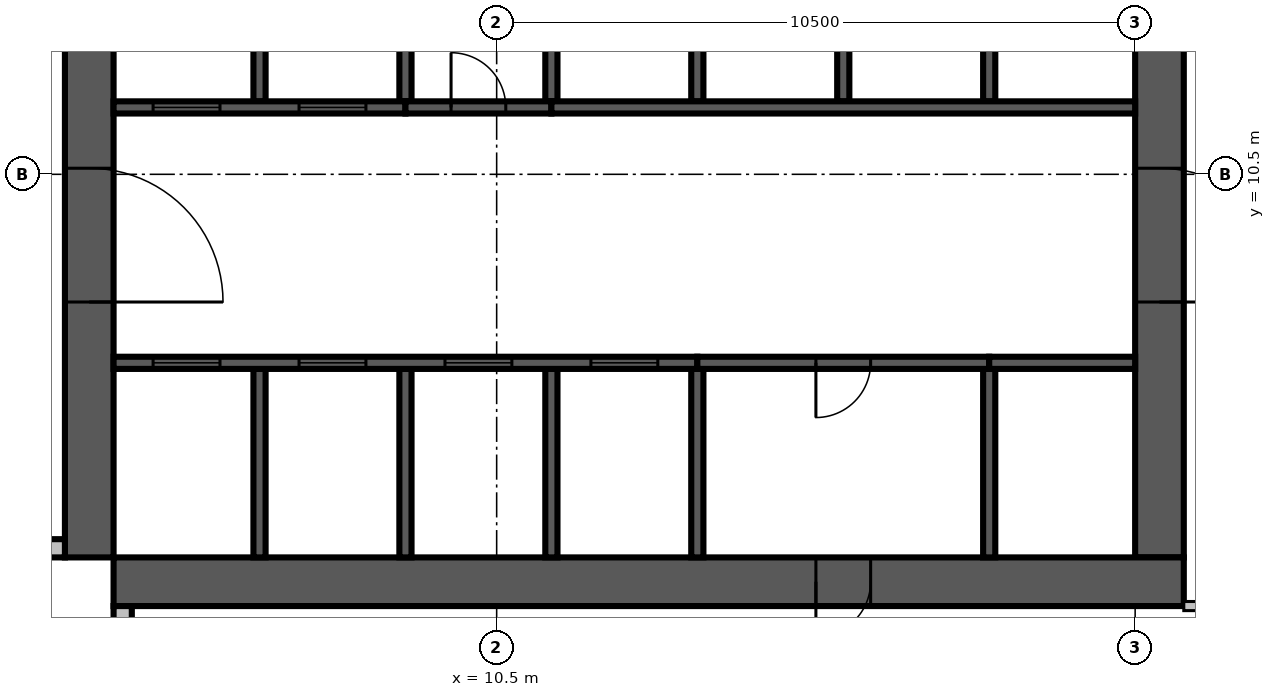
"""IFC4 building model, lengths in metres.
Left out: names, types, materials, properties, quantities, classifications, styles, units other than length and angle.
Written with IfcOpenShell. Run it as: python <this file> out.ifc"""

import sys

from ifc_helpers import new_model, si_unit, direction, frame, frame_2d, origin, place, context, subcontext, project, spatial, rectangle, extrude, source, transform, mapped, element, fill, save


model = new_model("IFC4")
c1 = context("Model", 3, precision=1e-05, world=origin(), true_north=direction((0.0, 1.0)))
c2 = subcontext(c1, "Body", "Model", "MODEL_VIEW")
j1 = project(units=[si_unit("LENGTHUNIT", "METRE"), si_unit("PLANEANGLEUNIT", "RADIAN")], contexts=[c1])
p1 = place(None, origin())
s1 = spatial("IfcSite", under=j1, at=p1, CompositionType="ELEMENT")
p2 = place(p1, origin())
s2 = spatial("IfcBuilding", under=s1, at=p2, CompositionType="ELEMENT")
p3 = place(p2, frame((0.0, 0.0, 185.4)))
s3 = spatial("IfcBuildingStorey", under=s2, at=p3, CompositionType="ELEMENT", Elevation=185.4)
m1 = source(origin(), c2, "Body", "SweptSolid", [
    extrude(rectangle(XDim=17.6, YDim=0.8, at=frame_2d((8.8, 0.0))), origin(), (0.0, 0.0, 1.0), 3.8),
])
p4 = place(p3, frame((3.8, 4.2, 0.0), z_axis=(0.0, 0.0, 1.0), x_axis=(0.0, 1.0, 0.0)))
e1 = element("IfcWall", 1, at=p4, inside=s3, PredefinedType="SHEAR", context=c2, shape_type="MappedRepresentation", body=[
    mapped(m1, transform((0.0, 0.0, 0.0), scale=1.0)),
])
m2 = source(origin(), c2, "Body", "SweptSolid", [
    extrude(rectangle(XDim=2.2, YDim=2.1, at=frame_2d((1.1, 1.05))), frame((0.0, 0.41, 0.0), z_axis=(0.0, -1.0, 0.0), x_axis=(1.0, 0.0, 0.0)), (0.0, 0.0, 1.0), 0.82),
])
p5 = place(p4, frame((4.2, 0.0, 0.0)))
e2 = element("IfcOpeningElement", 2, at=p5, cuts=e1, PredefinedType="OPENING", context=c2, shape_type="MappedRepresentation", body=[
    mapped(m2, transform((0.0, 0.0, 0.0), scale=1.0)),
])
m3 = source(origin(), c2, "Body", "SweptSolid", [
    extrude(rectangle(XDim=0.9, YDim=2.1, at=frame_2d((0.45, 1.05))), frame((0.0, 0.41, 0.0), z_axis=(0.0, -1.0, 0.0), x_axis=(1.0, 0.0, 0.0)), (0.0, 0.0, 1.0), 0.82),
])
p6 = place(p4, frame((10.95, 0.0, 0.0)))
e3 = element("IfcOpeningElement", 3, at=p6, cuts=e1, PredefinedType="OPENING", context=c2, shape_type="MappedRepresentation", body=[
    mapped(m3, transform((0.0, 0.0, 0.0), scale=1.0)),
])
m4 = source(origin(), c2, "Body", "SweptSolid", [
    extrude(rectangle(XDim=16.8, YDim=0.8, at=frame_2d((8.4, 0.0))), origin(), (0.0, 0.0, 1.0), 3.8),
])
p7 = place(p3, frame((21.4, 4.2, 0.0), z_axis=(0.0, 0.0, 1.0), x_axis=(0.0, 1.0, 0.0)))
e4 = element("IfcWall", 4, at=p7, inside=s3, PredefinedType="SHEAR", context=c2, shape_type="MappedRepresentation", body=[
    mapped(m4, transform((0.0, 0.0, 0.0), scale=1.0)),
])
p8 = place(p7, frame((4.2, 0.0, 0.0)))
e5 = element("IfcOpeningElement", 5, at=p8, cuts=e4, PredefinedType="OPENING", context=c2, shape_type="MappedRepresentation", body=[
    mapped(m2, transform((0.0, 0.0, 0.0), scale=1.0)),
])
m5 = source(origin(), c2, "Body", "SweptSolid", [
    extrude(rectangle(XDim=1.2, YDim=2.1, at=frame_2d((0.6, 1.05))), frame((0.0, 0.41, 0.0), z_axis=(0.0, -1.0, 0.0), x_axis=(1.0, 0.0, 0.0)), (0.0, 0.0, 1.0), 0.82),
])
p9 = place(p7, frame((14.7, 0.0, 0.0)))
e6 = element("IfcOpeningElement", 6, at=p9, cuts=e4, PredefinedType="OPENING", context=c2, shape_type="MappedRepresentation", body=[
    mapped(m5, transform((0.0, 0.0, 0.0), scale=1.0)),
])
p10 = place(p3, frame((4.2, 3.8, 0.0), z_axis=(0.0, 0.0, 1.0), x_axis=(1.0, 0.0, 0.0)))
e7 = element("IfcWall", 7, at=p10, inside=s3, PredefinedType="SHEAR", context=c2, shape_type="MappedRepresentation", body=[
    mapped(m1, transform((0.0, 0.0, 0.0), scale=1.0)),
])
p11 = place(p10, frame((11.55, 0.0, 0.0)))
e8 = element("IfcOpeningElement", 8, at=p11, cuts=e7, PredefinedType="OPENING", context=c2, shape_type="MappedRepresentation", body=[
    mapped(m3, transform((0.0, 0.0, 0.0), scale=1.0)),
])
m6 = source(origin(), c2, "Body", "SweptSolid", [
    extrude(rectangle(XDim=3.4, YDim=0.3, at=frame_2d((1.7, 0.0))), origin(), (0.0, 0.0, 1.0), 3.4),
])
p12 = place(p3, frame((0.0, 4.35, 0.0), z_axis=(0.0, 0.0, 1.0), x_axis=(1.0, 0.0, 0.0)))
e9 = element("IfcWall", 9, at=p12, inside=s3, PredefinedType="STANDARD", context=c2, shape_type="MappedRepresentation", body=[
    mapped(m6, transform((0.0, 0.0, 0.0), scale=1.0)),
])
m7 = source(origin(), c2, "Body", "SweptSolid", [
    extrude(rectangle(XDim=1.8, YDim=2.3, at=frame_2d((0.9, 1.15))), frame((0.0, 0.16, 0.0), z_axis=(0.0, -1.0, 0.0), x_axis=(1.0, 0.0, 0.0)), (0.0, 0.0, 1.0), 0.32),
])
p13 = place(p12, frame((1.2, 0.0, 0.6)))
e10 = element("IfcOpeningElement", 10, at=p13, cuts=e9, PredefinedType="OPENING", context=c2, shape_type="MappedRepresentation", body=[
    mapped(m7, transform((0.0, 0.0, 0.0), scale=1.0)),
])
p14 = place(p3, frame((4.35, 3.4, 0.0), z_axis=(0.0, 0.0, 1.0), x_axis=(0.0, -1.0, 0.0)))
e11 = element("IfcWall", 11, at=p14, inside=s3, PredefinedType="STANDARD", context=c2, shape_type="MappedRepresentation", body=[
    mapped(m6, transform((0.0, 0.0, 0.0), scale=1.0)),
])
p15 = place(p14, frame((0.4, 0.0, 0.6)))
e12 = element("IfcOpeningElement", 12, at=p15, cuts=e11, PredefinedType="OPENING", context=c2, shape_type="MappedRepresentation", body=[
    mapped(m7, transform((0.0, 0.0, 0.0), scale=1.0)),
])
m8 = source(origin(), c2, "Body", "SweptSolid", [
    extrude(rectangle(XDim=3.1, YDim=0.2, at=frame_2d((1.55, 0.0))), origin(), (0.0, 0.0, 1.0), 3.8),
])
for number, where, z_axis, x_axis in (
    (13, (6.6, 4.2, 0.0), (0.0, 0.0, 1.0), (0.0, 1.0, 0.0)),
    (14, (9.0, 4.2, 0.0), (0.0, 0.0, 1.0), (0.0, 1.0, 0.0)),
    (15, (11.4, 4.2, 0.0), (0.0, 0.0, 1.0), (0.0, 1.0, 0.0)),
):
    element("IfcWall", number, at=place(p3, frame(where, z_axis=z_axis, x_axis=x_axis)), inside=s3, PredefinedType="SOLIDWALL", context=c2, shape_type="MappedRepresentation", body=[
        mapped(m8, transform((0.0, 0.0, 0.0), scale=1.0)),
    ])
m9 = source(origin(), c2, "Body", "SweptSolid", [
    extrude(rectangle(XDim=3.1, YDim=0.2, at=frame_2d((1.55, 0.0))), origin(), (0.0, 0.0, 1.0), 3.4),
])
for number, where, z_axis, x_axis in (
    (16, (13.8, 4.2, 0.0), (0.0, 0.0, 1.0), (0.0, 1.0, 0.0)),
    (17, (18.6, 4.2, 0.0), (0.0, 0.0, 1.0), (0.0, 1.0, 0.0)),
):
    element("IfcWall", number, at=place(p3, frame(where, z_axis=z_axis, x_axis=x_axis)), inside=s3, PredefinedType="SOLIDWALL", context=c2, shape_type="MappedRepresentation", body=[
        mapped(m9, transform((0.0, 0.0, 0.0), scale=1.0)),
    ])
m10 = source(origin(), c2, "Body", "SweptSolid", [
    extrude(rectangle(XDim=3.0, YDim=0.2, at=frame_2d((1.5, 0.0))), origin(), (0.0, 0.0, 1.0), 3.8),
])
p16 = place(p3, frame((6.6, 11.7, 0.0), z_axis=(0.0, 0.0, 1.0), x_axis=(0.0, 1.0, 0.0)))
e18 = element("IfcWall", 18, at=p16, inside=s3, PredefinedType="SOLIDWALL", context=c2, shape_type="MappedRepresentation", body=[
    mapped(m10, transform((0.0, 0.0, 0.0), scale=1.0)),
])
m11 = source(origin(), c2, "Body", "SweptSolid", [
    extrude(rectangle(XDim=3.0, YDim=0.2, at=frame_2d((1.5, 0.0))), origin(), (0.0, 0.0, 1.0), 3.4),
])
for number, where, z_axis, x_axis in (
    (19, (9.0, 11.7, 0.0), (0.0, 0.0, 1.0), (0.0, 1.0, 0.0)),
    (20, (11.4, 11.7, 0.0), (0.0, 0.0, 1.0), (0.0, 1.0, 0.0)),
):
    element("IfcWall", number, at=place(p3, frame(where, z_axis=z_axis, x_axis=x_axis)), inside=s3, PredefinedType="SOLIDWALL", context=c2, shape_type="MappedRepresentation", body=[
        mapped(m11, transform((0.0, 0.0, 0.0), scale=1.0)),
    ])
for number, where, z_axis, x_axis in (
    (21, (13.8, 11.7, 0.0), (0.0, 0.0, 1.0), (0.0, 1.0, 0.0)),
    (22, (16.2, 11.7, 0.0), (0.0, 0.0, 1.0), (0.0, 1.0, 0.0)),
    (23, (18.6, 11.7, 0.0), (0.0, 0.0, 1.0), (0.0, 1.0, 0.0)),
):
    element("IfcWall", number, at=place(p3, frame(where, z_axis=z_axis, x_axis=x_axis)), inside=s3, PredefinedType="SOLIDWALL", context=c2, shape_type="MappedRepresentation", body=[
        mapped(m10, transform((0.0, 0.0, 0.0), scale=1.0)),
    ])
m12 = source(origin(), c2, "Body", "SweptSolid", [
    extrude(rectangle(XDim=9.6, YDim=0.2, at=frame_2d((4.8, 0.0))), origin(), (0.0, 0.0, 1.0), 3.8),
])
p17 = place(p3, frame((4.2, 7.4, 0.0), z_axis=(0.0, 0.0, 1.0), x_axis=(1.0, 0.0, 0.0)))
e24 = element("IfcWall", 24, at=p17, inside=s3, PredefinedType="SOLIDWALL", context=c2, shape_type="MappedRepresentation", body=[
    mapped(m12, transform((0.0, 0.0, 0.0), scale=1.0)),
])
m13 = source(origin(), c2, "Body", "SweptSolid", [
    extrude(rectangle(XDim=1.1, YDim=2.1, at=frame_2d((0.55, 1.05))), frame((0.0, 0.11, 0.0), z_axis=(0.0, -1.0, 0.0), x_axis=(1.0, 0.0, 0.0)), (0.0, 0.0, 1.0), 0.22),
])
p18 = place(p17, frame((0.65, 0.0, 0.0)))
e25 = element("IfcOpeningElement", 25, at=p18, cuts=e24, PredefinedType="OPENING", context=c2, shape_type="MappedRepresentation", body=[
    mapped(m13, transform((0.0, 0.0, 0.0), scale=1.0)),
])
p19 = place(p17, frame((3.05, 0.0, 0.0)))
e26 = element("IfcOpeningElement", 26, at=p19, cuts=e24, PredefinedType="OPENING", context=c2, shape_type="MappedRepresentation", body=[
    mapped(m13, transform((0.0, 0.0, 0.0), scale=1.0)),
])
p20 = place(p17, frame((5.45, 0.0, 0.0)))
e27 = element("IfcOpeningElement", 27, at=p20, cuts=e24, PredefinedType="OPENING", context=c2, shape_type="MappedRepresentation", body=[
    mapped(m13, transform((0.0, 0.0, 0.0), scale=1.0)),
])
p21 = place(p17, frame((7.85, 0.0, 0.0)))
e28 = element("IfcOpeningElement", 28, at=p21, cuts=e24, PredefinedType="OPENING", context=c2, shape_type="MappedRepresentation", body=[
    mapped(m13, transform((0.0, 0.0, 0.0), scale=1.0)),
])
m14 = source(origin(), c2, "Body", "SweptSolid", [
    extrude(rectangle(XDim=4.8, YDim=0.2, at=frame_2d((2.4, 0.0))), origin(), (0.0, 0.0, 1.0), 3.4),
])
p22 = place(p3, frame((13.8, 7.4, 0.0), z_axis=(0.0, 0.0, 1.0), x_axis=(1.0, 0.0, 0.0)))
e29 = element("IfcWall", 29, at=p22, inside=s3, PredefinedType="SOLIDWALL", context=c2, shape_type="MappedRepresentation", body=[
    mapped(m14, transform((0.0, 0.0, 0.0), scale=1.0)),
])
m15 = source(origin(), c2, "Body", "SweptSolid", [
    extrude(rectangle(XDim=0.9, YDim=2.1, at=frame_2d((0.45, 1.05))), frame((0.0, 0.11, 0.0), z_axis=(0.0, -1.0, 0.0), x_axis=(1.0, 0.0, 0.0)), (0.0, 0.0, 1.0), 0.22),
])
p23 = place(p22, frame((1.95, 0.0, 0.0)))
e30 = element("IfcOpeningElement", 30, at=p23, cuts=e29, PredefinedType="OPENING", context=c2, shape_type="MappedRepresentation", body=[
    mapped(m15, transform((0.0, 0.0, 0.0), scale=1.0)),
])
m16 = source(origin(), c2, "Body", "SweptSolid", [
    extrude(rectangle(XDim=2.4, YDim=0.2, at=frame_2d((1.2, 0.0))), origin(), (0.0, 0.0, 1.0), 3.8),
])
p24 = place(p3, frame((18.6, 7.4, 0.0), z_axis=(0.0, 0.0, 1.0), x_axis=(1.0, 0.0, 0.0)))
e31 = element("IfcWall", 31, at=p24, inside=s3, PredefinedType="SOLIDWALL", context=c2, shape_type="MappedRepresentation", body=[
    mapped(m16, transform((0.0, 0.0, 0.0), scale=1.0)),
])
m17 = source(origin(), c2, "Body", "SweptSolid", [
    extrude(rectangle(XDim=4.8, YDim=0.2, at=frame_2d((2.4, 0.0))), origin(), (0.0, 0.0, 1.0), 3.8),
])
p25 = place(p3, frame((4.2, 11.6, 0.0), z_axis=(0.0, 0.0, 1.0), x_axis=(1.0, 0.0, 0.0)))
e32 = element("IfcWall", 32, at=p25, inside=s3, PredefinedType="SOLIDWALL", context=c2, shape_type="MappedRepresentation", body=[
    mapped(m17, transform((0.0, 0.0, 0.0), scale=1.0)),
])
p26 = place(p25, frame((0.65, 0.0, 0.0)))
e33 = element("IfcOpeningElement", 33, at=p26, cuts=e32, PredefinedType="OPENING", context=c2, shape_type="MappedRepresentation", body=[
    mapped(m13, transform((0.0, 0.0, 0.0), scale=1.0)),
])
p27 = place(p25, frame((3.05, 0.0, 0.0)))
e34 = element("IfcOpeningElement", 34, at=p27, cuts=e32, PredefinedType="OPENING", context=c2, shape_type="MappedRepresentation", body=[
    mapped(m13, transform((0.0, 0.0, 0.0), scale=1.0)),
])
m18 = source(origin(), c2, "Body", "SweptSolid", [
    extrude(rectangle(XDim=2.4, YDim=0.2, at=frame_2d((1.2, 0.0))), origin(), (0.0, 0.0, 1.0), 3.4),
])
p28 = place(p3, frame((9.0, 11.6, 0.0), z_axis=(0.0, 0.0, 1.0), x_axis=(1.0, 0.0, 0.0)))
e35 = element("IfcWall", 35, at=p28, inside=s3, PredefinedType="SOLIDWALL", context=c2, shape_type="MappedRepresentation", body=[
    mapped(m18, transform((0.0, 0.0, 0.0), scale=1.0)),
])
p29 = place(p28, frame((0.75, 0.0, 0.0)))
e36 = element("IfcOpeningElement", 36, at=p29, cuts=e35, PredefinedType="OPENING", context=c2, shape_type="MappedRepresentation", body=[
    mapped(m15, transform((0.0, 0.0, 0.0), scale=1.0)),
])
p30 = place(p3, frame((11.4, 11.6, 0.0), z_axis=(0.0, 0.0, 1.0), x_axis=(1.0, 0.0, 0.0)))
e37 = element("IfcWall", 37, at=p30, inside=s3, PredefinedType="SOLIDWALL", context=c2, shape_type="MappedRepresentation", body=[
    mapped(m12, transform((0.0, 0.0, 0.0), scale=1.0)),
])
m19 = source(origin(), c2, "Body", "SweptSolid", [
    extrude(rectangle(XDim=7.525, YDim=0.15, at=frame_2d((3.763, 0.0))), origin(), (0.0, 0.0, 1.0), 3.4),
])
p31 = place(p3, frame((21.8, 3.4, 0.0), z_axis=(0.0, 0.0, 1.0), x_axis=(1.0, 0.0, 0.0)))
e38 = element("IfcWall", 38, at=p31, inside=s3, PredefinedType="PARTITIONING", context=c2, shape_type="MappedRepresentation", body=[
    mapped(m19, transform((0.0, 0.0, 0.0), scale=1.0)),
])
m20 = source(origin(), c2, "Body", "SweptSolid", [
    extrude(rectangle(XDim=1.0, YDim=2.1, at=frame_2d((0.5, 1.05))), frame((0.0, 0.085, 0.0), z_axis=(0.0, -1.0, 0.0), x_axis=(1.0, 0.0, 0.0)), (0.0, 0.0, 1.0), 0.17),
])
p32 = place(p31, frame((3.3, 0.0, 0.0)))
e39 = element("IfcOpeningElement", 39, at=p32, cuts=e38, PredefinedType="OPENING", context=c2, shape_type="MappedRepresentation", body=[
    mapped(m20, transform((0.0, 0.0, 0.0), scale=1.0)),
])
m21 = source(origin(), c2, "Body", "SweptSolid", [
    extrude(rectangle(XDim=0.9, YDim=2.1, at=frame_2d((0.45, 1.05))), frame((0.0, 0.085, 0.0), z_axis=(0.0, -1.0, 0.0), x_axis=(1.0, 0.0, 0.0)), (0.0, 0.0, 1.0), 0.17),
])
p33 = place(p31, frame((2.312, 0.0, 0.0)))
e40 = element("IfcOpeningElement", 40, at=p33, cuts=e38, PredefinedType="OPENING", context=c2, shape_type="MappedRepresentation", body=[
    mapped(m21, transform((0.0, 0.0, 0.0), scale=1.0)),
])
m22 = source(origin(), c2, "Body", "SweptSolid", [
    extrude(rectangle(XDim=1.1, YDim=2.1, at=frame_2d((0.55, 1.05))), frame((0.0, 0.025, 0.0), z_axis=(0.0, -1.0, 0.0), x_axis=(1.0, 0.0, 0.0)), (0.0, 0.0, 1.0), 0.05),
])
p34 = place(p18, origin())
e41 = element("IfcDoor", 41, at=p34, inside=s3, OperationType="SLIDING_TO_LEFT", PredefinedType="DOOR", context=c2, shape_type="MappedRepresentation", body=[
    mapped(m22, transform((0.0, 0.0, 0.0), scale=1.0)),
])
fill(e25, e41)
p35 = place(p19, origin())
e42 = element("IfcDoor", 42, at=p35, inside=s3, OperationType="SLIDING_TO_LEFT", PredefinedType="DOOR", context=c2, shape_type="MappedRepresentation", body=[
    mapped(m22, transform((0.0, 0.0, 0.0), scale=1.0)),
])
fill(e26, e42)
p36 = place(p20, origin())
e43 = element("IfcDoor", 43, at=p36, inside=s3, OperationType="SLIDING_TO_LEFT", PredefinedType="DOOR", context=c2, shape_type="MappedRepresentation", body=[
    mapped(m22, transform((0.0, 0.0, 0.0), scale=1.0)),
])
fill(e27, e43)
p37 = place(p21, origin())
e44 = element("IfcDoor", 44, at=p37, inside=s3, OperationType="SLIDING_TO_LEFT", PredefinedType="DOOR", context=c2, shape_type="MappedRepresentation", body=[
    mapped(m22, transform((0.0, 0.0, 0.0), scale=1.0)),
])
fill(e28, e44)
m23 = source(origin(), c2, "Body", "SweptSolid", [
    extrude(rectangle(XDim=0.9, YDim=2.1, at=frame_2d((0.45, 1.05))), frame((0.0, 0.025, 0.0), z_axis=(0.0, -1.0, 0.0), x_axis=(1.0, 0.0, 0.0)), (0.0, 0.0, 1.0), 0.05),
])
p38 = place(p23, origin())
e45 = element("IfcDoor", 45, at=p38, inside=s3, OperationType="SINGLE_SWING_RIGHT", PredefinedType="DOOR", context=c2, shape_type="MappedRepresentation", body=[
    mapped(m23, transform((0.0, 0.0, 0.0), scale=1.0)),
])
fill(e30, e45)
p39 = place(p26, origin())
e46 = element("IfcDoor", 46, at=p39, inside=s3, OperationType="SLIDING_TO_LEFT", PredefinedType="DOOR", context=c2, shape_type="MappedRepresentation", body=[
    mapped(m22, transform((0.0, 0.0, 0.0), scale=1.0)),
])
fill(e33, e46)
p40 = place(p27, origin())
e47 = element("IfcDoor", 47, at=p40, inside=s3, OperationType="SLIDING_TO_LEFT", PredefinedType="DOOR", context=c2, shape_type="MappedRepresentation", body=[
    mapped(m22, transform((0.0, 0.0, 0.0), scale=1.0)),
])
fill(e34, e47)
p41 = place(p29, origin())
e48 = element("IfcDoor", 48, at=p41, inside=s3, OperationType="SINGLE_SWING_LEFT", PredefinedType="DOOR", context=c2, shape_type="MappedRepresentation", body=[
    mapped(m23, transform((0.0, 0.0, 0.0), scale=1.0)),
])
fill(e36, e48)
m24 = source(origin(), c2, "Body", "SweptSolid", [
    extrude(rectangle(XDim=2.2, YDim=2.1, at=frame_2d((1.1, 1.05))), frame((0.0, 0.025, 0.0), z_axis=(0.0, -1.0, 0.0), x_axis=(1.0, 0.0, 0.0)), (0.0, 0.0, 1.0), 0.05),
])
p42 = place(p8, origin())
e49 = element("IfcDoor", 49, at=p42, inside=s3, OperationType="DOUBLE_DOOR_SINGLE_SWING", PredefinedType="DOOR", context=c2, shape_type="MappedRepresentation", body=[
    mapped(m24, transform((0.0, 0.0, 0.0), scale=1.0)),
])
fill(e5, e49)
p43 = place(p5, origin())
e50 = element("IfcDoor", 50, at=p43, inside=s3, OperationType="DOUBLE_DOOR_SINGLE_SWING", PredefinedType="DOOR", context=c2, shape_type="MappedRepresentation", body=[
    mapped(m24, transform((0.0, 0.0, 0.0), scale=1.0)),
])
fill(e2, e50)
p44 = place(p11, origin())
e51 = element("IfcDoor", 51, at=p44, inside=s3, OperationType="SINGLE_SWING_RIGHT", PredefinedType="DOOR", context=c2, shape_type="MappedRepresentation", body=[
    mapped(m23, transform((0.0, 0.0, 0.0), scale=1.0)),
])
fill(e8, e51)
save(model, sys.argv[1])
